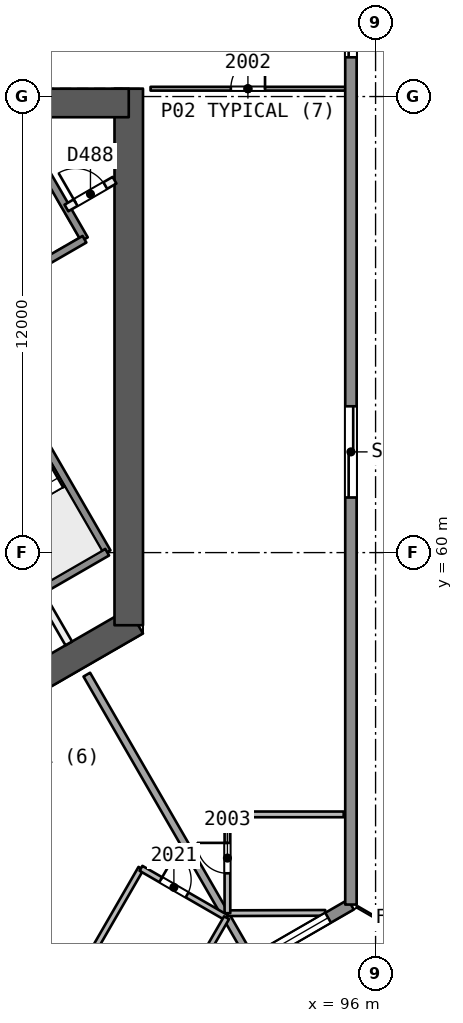
"""IFC4 building model, lengths in metres.
Left out: names, types, materials, properties, quantities, classifications, styles, units other than length and angle.
Written with IfcOpenShell. Run it as: python <this file> out.ifc"""

import sys

from ifc_helpers import new_model, si_unit, direction, frame, frame_2d, origin, place, context, subcontext, project, spatial, rectangle, extrude, element, fill, save


model = new_model("IFC4")
c1 = context("Model", 3, precision=1e-05, world=origin(), true_north=direction((0.0, 1.0)))
c2 = subcontext(c1, "Body", "Model", "MODEL_VIEW")
j1 = project(units=[si_unit("LENGTHUNIT", "METRE"), si_unit("PLANEANGLEUNIT", "RADIAN")], contexts=[c1])
p1 = place(None, origin())
s1 = spatial("IfcSite", under=j1, at=p1, CompositionType="ELEMENT")
p2 = place(p1, origin())
s2 = spatial("IfcBuilding", under=s1, at=p2, CompositionType="ELEMENT")
p3 = place(p2, frame((0.0, 0.0, 86.9)))
s3 = spatial("IfcBuildingStorey", under=s2, at=p3, CompositionType="ELEMENT", Elevation=86.9)
p4 = place(p3, frame((86.723, 56.483, 0.0), z_axis=(0.0, 0.0, 1.0), x_axis=(0.866017201164, 0.500014207086, 0.0)))
e1 = element("IfcWall", 1, at=p4, inside=s3, PredefinedType="SHEAR", context=c2, shape_type="SweptSolid", body=[
    extrude(rectangle(XDim=3.429, YDim=0.75, at=frame_2d((1.714, 0.0))), origin(), (0.0, 0.0, 1.0), 3.7),
])
p5 = place(p3, frame((89.505, 58.089, 0.0), z_axis=(0.0, 0.0, 1.0), x_axis=(0.0, 1.0, 0.0)))
e2 = element("IfcWall", 2, at=p5, inside=s3, PredefinedType="SHEAR", context=c2, shape_type="SweptSolid", body=[
    extrude(rectangle(XDim=14.117, YDim=0.75, at=frame_2d((7.059, 0.0))), origin(), (0.0, 0.0, 1.0), 3.7),
])
p6 = place(p3, frame((89.505, 71.831, 0.0), z_axis=(0.0, 0.0, 1.0), x_axis=(-1.0, 0.0, 0.0)))
e3 = element("IfcWall", 3, at=p6, inside=s3, PredefinedType="SHEAR", context=c2, shape_type="SweptSolid", body=[
    extrude(rectangle(XDim=10.005, YDim=0.75, at=frame_2d((5.002, 0.0))), origin(), (0.0, 0.0, 1.0), 3.7),
])
p7 = place(p6, frame((7.855, 0.0, 0.0)))
e4 = element("IfcOpeningElement", 4, at=p7, cuts=e3, PredefinedType="OPENING", context=c2, shape_type="SweptSolid", body=[
    extrude(rectangle(XDim=1.2, YDim=2.1, at=frame_2d((0.6, 1.05))), frame((0.0, 0.385, 0.0), z_axis=(0.0, -1.0, 0.0), x_axis=(1.0, 0.0, 0.0)), (0.0, 0.0, 1.0), 0.771),
])
p8 = place(p3, frame((90.079, 72.206, 0.0), z_axis=(0.0, 0.0, 1.0), x_axis=(1.0, 0.0, 0.0)))
e5 = element("IfcWall", 5, at=p8, inside=s3, PredefinedType="PARTITIONING", context=c2, shape_type="SweptSolid", body=[
    extrude(rectangle(XDim=5.123, YDim=0.1, at=frame_2d((2.562, 0.0))), origin(), (0.0, 0.0, 1.0), 3.2),
])
p9 = place(p8, frame((2.112, 0.0, 0.0)))
e6 = element("IfcOpeningElement", 6, at=p9, cuts=e5, PredefinedType="OPENING", context=c2, shape_type="SweptSolid", body=[
    extrude(rectangle(XDim=0.9, YDim=2.1, at=frame_2d((0.45, 1.05))), frame((0.0, 0.061, 0.0), z_axis=(0.0, -1.0, 0.0), x_axis=(1.0, 0.0, 0.0)), (0.0, 0.0, 1.0), 0.121),
])
p10 = place(p3, frame((94.675, 50.521, 0.0), z_axis=(0.0, 0.0, 1.0), x_axis=(-0.99999416924, -0.00341489187, 0.0)))
e7 = element("IfcWall", 7, at=p10, inside=s3, PredefinedType="PARTITIONING", context=c2, shape_type="SweptSolid", body=[
    extrude(rectangle(XDim=2.574, YDim=0.15, at=frame_2d((1.287, 0.0))), origin(), (0.0, 0.0, 1.0), 3.2),
])
p11 = place(p3, frame((92.102, 50.512, 0.0), z_axis=(0.0, 0.0, 1.0), x_axis=(0.0, 1.0, 0.0)))
e8 = element("IfcWall", 8, at=p11, inside=s3, PredefinedType="PARTITIONING", context=c2, shape_type="SweptSolid", body=[
    extrude(rectangle(XDim=2.6, YDim=0.15, at=frame_2d((1.3, 0.0))), origin(), (0.0, 0.0, 1.0), 3.2),
])
p12 = place(p11, frame((1.05, 0.0, 0.0)))
e9 = element("IfcOpeningElement", 9, at=p12, cuts=e8, PredefinedType="OPENING", context=c2, shape_type="SweptSolid", body=[
    extrude(rectangle(XDim=0.8, YDim=2.1, at=frame_2d((0.4, 1.05))), frame((0.0, 0.085, 0.0), z_axis=(0.0, -1.0, 0.0), x_axis=(1.0, 0.0, 0.0)), (0.0, 0.0, 1.0), 0.171),
])
p13 = place(p3, frame((92.102, 53.112, 0.0), z_axis=(0.0, 0.0, 1.0), x_axis=(1.0, 0.0, 0.0)))
e10 = element("IfcWall", 10, at=p13, inside=s3, PredefinedType="PARTITIONING", context=c2, shape_type="SweptSolid", body=[
    extrude(rectangle(XDim=3.06, YDim=0.15, at=frame_2d((1.53, 0.0))), origin(), (0.0, 0.0, 1.0), 3.2),
])
p14 = place(p3, frame((88.401, 56.789, 0.0), z_axis=(0.0, 0.0, 1.0), x_axis=(0.499995498429, -0.866028002752, 0.0)))
e11 = element("IfcWall", 11, at=p14, inside=s3, PredefinedType="PARTITIONING", context=c2, shape_type="SweptSolid", body=[
    extrude(rectangle(XDim=8.565, YDim=0.2, at=frame_2d((4.283, 0.0))), origin(), (0.0, 0.0, 1.0), 3.2),
])
p15 = place(p3, frame((88.297, 49.043, 0.0), z_axis=(0.0, 0.0, 1.0), x_axis=(0.499966498333, 0.866044745117, 0.0)))
e12 = element("IfcWall", 12, at=p15, inside=s3, PredefinedType="PARTITIONING", context=c2, shape_type="SweptSolid", body=[
    extrude(rectangle(XDim=3.06, YDim=0.15, at=frame_2d((1.53, 0.0))), origin(), (0.0, 0.0, 1.0), 3.2),
])
p16 = place(p3, frame((89.827, 51.693, 0.0), z_axis=(0.0, 0.0, 1.0), x_axis=(0.866021400173, -0.500006934395, 0.0)))
e13 = element("IfcWall", 13, at=p16, inside=s3, PredefinedType="PARTITIONING", context=c2, shape_type="SweptSolid", body=[
    extrude(rectangle(XDim=2.6, YDim=0.15, at=frame_2d((1.3, 0.0))), origin(), (0.0, 0.0, 1.0), 3.2),
])
p17 = place(p16, frame((0.6, 0.0, 0.0)))
e14 = element("IfcOpeningElement", 14, at=p17, cuts=e13, PredefinedType="OPENING", context=c2, shape_type="SweptSolid", body=[
    extrude(rectangle(XDim=0.8, YDim=2.1, at=frame_2d((0.4, 1.05))), frame((0.0, 0.085, 0.0), z_axis=(0.0, -1.0, 0.0), x_axis=(1.0, 0.0, 0.0)), (0.0, 0.0, 1.0), 0.171),
])
p18 = place(p3, frame((92.079, 50.393, 0.0), z_axis=(0.0, 0.0, 1.0), x_axis=(-0.499953838557, -0.866052053466, 0.0)))
e15 = element("IfcWall", 15, at=p18, inside=s3, PredefinedType="PARTITIONING", context=c2, shape_type="SweptSolid", body=[
    extrude(rectangle(XDim=2.375, YDim=0.15, at=frame_2d((1.188, 0.0))), origin(), (0.0, 0.0, 1.0), 3.2),
])
p19 = place(p3, frame((95.351, 50.739, 0.0), z_axis=(0.0, 0.0, 1.0), x_axis=(-0.866026717539, -0.499997724503, 0.0)))
e16 = element("IfcWall", 16, at=p19, inside=s3, PredefinedType="SOLIDWALL", context=c2, shape_type="SweptSolid", body=[
    extrude(rectangle(XDim=5.988, YDim=0.3, at=frame_2d((2.994, 0.0))), origin(), (0.0, 0.0, 1.0), 3.2),
])
p20 = place(p19, frame((0.693, 0.0, 0.9)))
e17 = element("IfcOpeningElement", 17, at=p20, cuts=e16, PredefinedType="OPENING", context=c2, shape_type="SweptSolid", body=[
    extrude(rectangle(XDim=1.8, YDim=1.5, at=frame_2d((0.9, 0.75))), frame((0.0, 0.161, 0.0), z_axis=(0.0, -1.0, 0.0), x_axis=(1.0, 0.0, 0.0)), (0.0, 0.0, 1.0), 0.321),
])
p21 = place(p19, frame((3.389, 0.0, 0.9)))
e18 = element("IfcOpeningElement", 18, at=p21, cuts=e16, PredefinedType="OPENING", context=c2, shape_type="SweptSolid", body=[
    extrude(rectangle(XDim=1.8, YDim=1.5, at=frame_2d((0.9, 0.75))), frame((0.0, 0.161, 0.0), z_axis=(0.0, -1.0, 0.0), x_axis=(1.0, 0.0, 0.0)), (0.0, 0.0, 1.0), 0.321),
])
p22 = place(p3, frame((95.351, 109.261, 0.0), z_axis=(0.0, 0.0, 1.0), x_axis=(0.0, -1.0, 0.0)))
e19 = element("IfcWall", 19, at=p22, inside=s3, PredefinedType="SOLIDWALL", context=c2, shape_type="SweptSolid", body=[
    extrude(rectangle(XDim=58.522, YDim=0.3, at=frame_2d((29.261, 0.0))), origin(), (0.0, 0.0, 1.0), 3.2),
])
p23 = place(p22, frame((28.061, 0.0, 0.0)))
e20 = element("IfcOpeningElement", 20, at=p23, cuts=e19, PredefinedType="OPENING", context=c2, shape_type="SweptSolid", body=[
    extrude(rectangle(XDim=2.4, YDim=2.4, at=frame_2d((1.2, 1.2))), frame((0.0, 0.161, 0.0), z_axis=(0.0, -1.0, 0.0), x_axis=(1.0, 0.0, 0.0)), (0.0, 0.0, 1.0), 0.321),
])
p24 = place(p22, frame((33.829, 0.0, 0.0)))
e21 = element("IfcOpeningElement", 21, at=p24, cuts=e19, PredefinedType="OPENING", context=c2, shape_type="SweptSolid", body=[
    extrude(rectangle(XDim=2.4, YDim=2.4, at=frame_2d((1.2, 1.2))), frame((0.0, 0.161, 0.0), z_axis=(0.0, -1.0, 0.0), x_axis=(1.0, 0.0, 0.0)), (0.0, 0.0, 1.0), 0.321),
])
p25 = place(p22, frame((45.411, 0.0, 0.0)))
e22 = element("IfcOpeningElement", 22, at=p25, cuts=e19, PredefinedType="OPENING", context=c2, shape_type="SweptSolid", body=[
    extrude(rectangle(XDim=2.4, YDim=2.4, at=frame_2d((1.2, 1.2))), frame((0.0, 0.161, 0.0), z_axis=(0.0, -1.0, 0.0), x_axis=(1.0, 0.0, 0.0)), (0.0, 0.0, 1.0), 0.321),
])
p26 = place(p22, frame((22.293, 0.0, 0.0)))
e23 = element("IfcOpeningElement", 23, at=p26, cuts=e19, PredefinedType="OPENING", context=c2, shape_type="SweptSolid", body=[
    extrude(rectangle(XDim=2.4, YDim=2.4, at=frame_2d((1.2, 1.2))), frame((0.0, 0.161, 0.0), z_axis=(0.0, -1.0, 0.0), x_axis=(1.0, 0.0, 0.0)), (0.0, 0.0, 1.0), 0.321),
])
p27 = place(p22, frame((10.658, 0.0, 0.0)))
e24 = element("IfcOpeningElement", 24, at=p27, cuts=e19, PredefinedType="OPENING", context=c2, shape_type="SweptSolid", body=[
    extrude(rectangle(XDim=2.4, YDim=2.4, at=frame_2d((1.2, 1.2))), frame((0.0, 0.161, 0.0), z_axis=(0.0, -1.0, 0.0), x_axis=(1.0, 0.0, 0.0)), (0.0, 0.0, 1.0), 0.321),
])
p28 = place(p3, frame((90.165, 47.745, 0.0), z_axis=(0.0, 0.0, 1.0), x_axis=(-0.866025940441, 0.499999070483, 0.0)))
e25 = element("IfcWall", 25, at=p28, inside=s3, PredefinedType="SOLIDWALL", context=c2, shape_type="SweptSolid", body=[
    extrude(rectangle(XDim=58.522, YDim=0.3, at=frame_2d((29.261, 0.0))), origin(), (0.0, 0.0, 1.0), 3.2),
])
p29 = place(p28, frame((44.294, 0.0, 0.0)))
e26 = element("IfcOpeningElement", 26, at=p29, cuts=e25, PredefinedType="OPENING", context=c2, shape_type="SweptSolid", body=[
    extrude(rectangle(XDim=2.4, YDim=2.4, at=frame_2d((1.2, 1.2))), frame((0.0, 0.161, 0.0), z_axis=(0.0, -1.0, 0.0), x_axis=(1.0, 0.0, 0.0)), (0.0, 0.0, 1.0), 0.321),
])
p30 = place(p28, frame((22.605, 0.0, 0.0)))
e27 = element("IfcOpeningElement", 27, at=p30, cuts=e25, PredefinedType="OPENING", context=c2, shape_type="SweptSolid", body=[
    extrude(rectangle(XDim=2.4, YDim=2.4, at=frame_2d((1.2, 1.2))), frame((0.0, 0.161, 0.0), z_axis=(0.0, -1.0, 0.0), x_axis=(1.0, 0.0, 0.0)), (0.0, 0.0, 1.0), 0.321),
])
p31 = place(p28, frame((10.658, 0.0, 0.0)))
e28 = element("IfcOpeningElement", 28, at=p31, cuts=e25, PredefinedType="OPENING", context=c2, shape_type="SweptSolid", body=[
    extrude(rectangle(XDim=2.4, YDim=2.4, at=frame_2d((1.2, 1.2))), frame((0.0, 0.161, 0.0), z_axis=(0.0, -1.0, 0.0), x_axis=(1.0, 0.0, 0.0)), (0.0, 0.0, 1.0), 0.321),
])
p32 = place(p28, frame((29.92, 0.0, 0.9)))
e29 = element("IfcOpeningElement", 29, at=p32, cuts=e25, PredefinedType="OPENING", context=c2, shape_type="SweptSolid", body=[
    extrude(rectangle(XDim=1.8, YDim=1.5, at=frame_2d((0.9, 0.75))), frame((0.0, 0.161, 0.0), z_axis=(0.0, -1.0, 0.0), x_axis=(1.0, 0.0, 0.0)), (0.0, 0.0, 1.0), 0.321),
])
p33 = place(p28, frame((26.802, 0.0, 0.9)))
e30 = element("IfcOpeningElement", 30, at=p33, cuts=e25, PredefinedType="OPENING", context=c2, shape_type="SweptSolid", body=[
    extrude(rectangle(XDim=1.8, YDim=1.5, at=frame_2d((0.9, 0.75))), frame((0.0, 0.161, 0.0), z_axis=(0.0, -1.0, 0.0), x_axis=(1.0, 0.0, 0.0)), (0.0, 0.0, 1.0), 0.321),
])
p34 = place(p3, frame((87.09, 59.06, 0.0), z_axis=(0.0, 0.0, 1.0), x_axis=(0.499937194881, -0.866061661301, 0.0)))
e31 = element("IfcWall", 31, at=p34, inside=s3, PredefinedType="PARTITIONING", context=c2, shape_type="SweptSolid", body=[
    extrude(rectangle(XDim=1.673, YDim=0.2, at=frame_2d((0.836, 0.0))), origin(), (0.0, 0.0, 1.0), 3.2),
])
p35 = place(p3, frame((85.087, 66.679, 0.0), z_axis=(0.0, 0.0, 1.0), x_axis=(0.500019787375, -0.866013979237, 0.0)))
e32 = element("IfcWall", 32, at=p35, inside=s3, PredefinedType="SOLIDWALL", context=c2, shape_type="SweptSolid", body=[
    extrude(rectangle(XDim=7.7, YDim=0.2, at=frame_2d((3.85, 0.0))), origin(), (0.0, 0.0, 1.0), 3.2),
])
p36 = place(p35, frame((0.55, 0.0, 0.0)))
e33 = element("IfcOpeningElement", 33, at=p36, cuts=e32, PredefinedType="OPENING", context=c2, shape_type="SweptSolid", body=[
    extrude(rectangle(XDim=1.1, YDim=2.1, at=frame_2d((0.55, 1.05))), frame((0.0, 0.11, 0.0), z_axis=(0.0, -1.0, 0.0), x_axis=(1.0, 0.0, 0.0)), (0.0, 0.0, 1.0), 0.221),
])
p37 = place(p3, frame((86.965, 70.626, 0.0), z_axis=(0.0, 0.0, 1.0), x_axis=(0.499996545922, -0.866027397988, 0.0)))
e34 = element("IfcWall", 34, at=p37, inside=s3, PredefinedType="SOLIDWALL", context=c2, shape_type="SweptSolid", body=[
    extrude(rectangle(XDim=2.75, YDim=0.2, at=frame_2d((1.375, 0.0))), origin(), (0.0, 0.0, 1.0), 3.2),
])
p38 = place(p3, frame((87.865, 69.068, 0.0), z_axis=(0.0, 0.0, 1.0), x_axis=(0.865982457891, 0.500074377092, 0.0)))
e35 = element("IfcWall", 35, at=p38, inside=s3, PredefinedType="PARTITIONING", context=c2, shape_type="SweptSolid", body=[
    extrude(rectangle(XDim=1.461, YDim=0.2, at=frame_2d((0.73, 0.0))), origin(), (0.0, 0.0, 1.0), 3.2),
])
p39 = place(p38, frame((0.281, 0.0, 0.0)))
e36 = element("IfcOpeningElement", 36, at=p39, cuts=e35, PredefinedType="OPENING", context=c2, shape_type="SweptSolid", body=[
    extrude(rectangle(XDim=0.9, YDim=2.1, at=frame_2d((0.45, 1.05))), frame((0.0, 0.11, 0.0), z_axis=(0.0, -1.0, 0.0), x_axis=(1.0, 0.0, 0.0)), (0.0, 0.0, 1.0), 0.221),
])
p40 = place(p3, frame((86.348, 67.095, 0.0), z_axis=(0.0, 0.0, 1.0), x_axis=(0.86602648383, 0.499998129301, 0.0)))
e37 = element("IfcWall", 37, at=p40, inside=s3, PredefinedType="SOLIDWALL", context=c2, shape_type="SweptSolid", body=[
    extrude(rectangle(XDim=2.3, YDim=0.2, at=frame_2d((1.15, 0.0))), origin(), (0.0, 0.0, 1.0), 3.2),
])
p41 = place(p3, frame((85.343, 57.935, 0.0), z_axis=(0.0, 0.0, 1.0), x_axis=(0.866004344652, 0.500036473714, 0.0)))
e38 = element("IfcWall", 38, at=p41, inside=s3, PredefinedType="SOLIDWALL", context=c2, shape_type="SweptSolid", body=[
    extrude(rectangle(XDim=4.15, YDim=0.2, at=frame_2d((2.075, 0.0))), origin(), (0.0, 0.0, 1.0), 3.2),
])
p42 = place(p9, origin())
e39 = element("IfcDoor", 39, at=p42, inside=s3, OperationType="SINGLE_SWING_RIGHT", PredefinedType="NOTDEFINED", context=c2, shape_type="SweptSolid", body=[
    extrude(rectangle(XDim=0.9, YDim=2.1, at=frame_2d((0.45, 1.05))), frame((0.0, 0.025, 0.0), z_axis=(0.0, -1.0, 0.0), x_axis=(1.0, 0.0, 0.0)), (0.0, 0.0, 1.0), 0.05),
])
fill(e6, e39)
p43 = place(p12, origin())
e40 = element("IfcDoor", 40, at=p43, inside=s3, OperationType="SINGLE_SWING_RIGHT", PredefinedType="NOTDEFINED", context=c2, shape_type="SweptSolid", body=[
    extrude(rectangle(XDim=0.8, YDim=2.1, at=frame_2d((0.4, 1.05))), frame((0.0, 0.025, 0.0), z_axis=(0.0, -1.0, 0.0), x_axis=(1.0, 0.0, 0.0)), (0.0, 0.0, 1.0), 0.05),
])
fill(e9, e40)
p44 = place(p17, origin())
e41 = element("IfcDoor", 41, at=p44, inside=s3, OperationType="SINGLE_SWING_LEFT", PredefinedType="NOTDEFINED", context=c2, shape_type="SweptSolid", body=[
    extrude(rectangle(XDim=0.8, YDim=2.1, at=frame_2d((0.4, 1.05))), frame((0.0, 0.025, 0.0), z_axis=(0.0, -1.0, 0.0), x_axis=(1.0, 0.0, 0.0)), (0.0, 0.0, 1.0), 0.05),
])
fill(e14, e41)
p45 = place(p20, origin())
e42 = element("IfcWindow", 42, at=p45, inside=s3, PartitioningType="SINGLE_PANEL", PredefinedType="WINDOW", context=c2, shape_type="SweptSolid", body=[
    extrude(rectangle(XDim=1.8, YDim=1.5, at=frame_2d((0.9, 0.75))), frame((0.0, 0.03, 0.0), z_axis=(0.0, -1.0, 0.0), x_axis=(1.0, 0.0, 0.0)), (0.0, 0.0, 1.0), 0.06),
])
fill(e17, e42)
p46 = place(p24, origin())
e43 = element("IfcDoor", 43, at=p46, inside=s3, OperationType="SLIDING_TO_RIGHT", PredefinedType="NOTDEFINED", context=c2, shape_type="SweptSolid", body=[
    extrude(rectangle(XDim=2.4, YDim=2.4, at=frame_2d((1.2, 1.2))), frame((0.0, 0.025, 0.0), z_axis=(0.0, -1.0, 0.0), x_axis=(1.0, 0.0, 0.0)), (0.0, 0.0, 1.0), 0.05),
])
fill(e21, e43)
p47 = place(p25, origin())
e44 = element("IfcDoor", 44, at=p47, inside=s3, OperationType="SLIDING_TO_LEFT", PredefinedType="NOTDEFINED", context=c2, shape_type="SweptSolid", body=[
    extrude(rectangle(XDim=2.4, YDim=2.4, at=frame_2d((1.2, 1.2))), frame((0.0, 0.025, 0.0), z_axis=(0.0, -1.0, 0.0), x_axis=(1.0, 0.0, 0.0)), (0.0, 0.0, 1.0), 0.05),
])
fill(e22, e44)
p48 = place(p39, origin())
e45 = element("IfcDoor", 45, at=p48, inside=s3, OperationType="SINGLE_SWING_LEFT", PredefinedType="NOTDEFINED", context=c2, shape_type="SweptSolid", body=[
    extrude(rectangle(XDim=0.9, YDim=2.1, at=frame_2d((0.45, 1.05))), frame((0.0, 0.025, 0.0), z_axis=(0.0, -1.0, 0.0), x_axis=(1.0, 0.0, 0.0)), (0.0, 0.0, 1.0), 0.05),
])
fill(e36, e45)
save(model, sys.argv[1])
